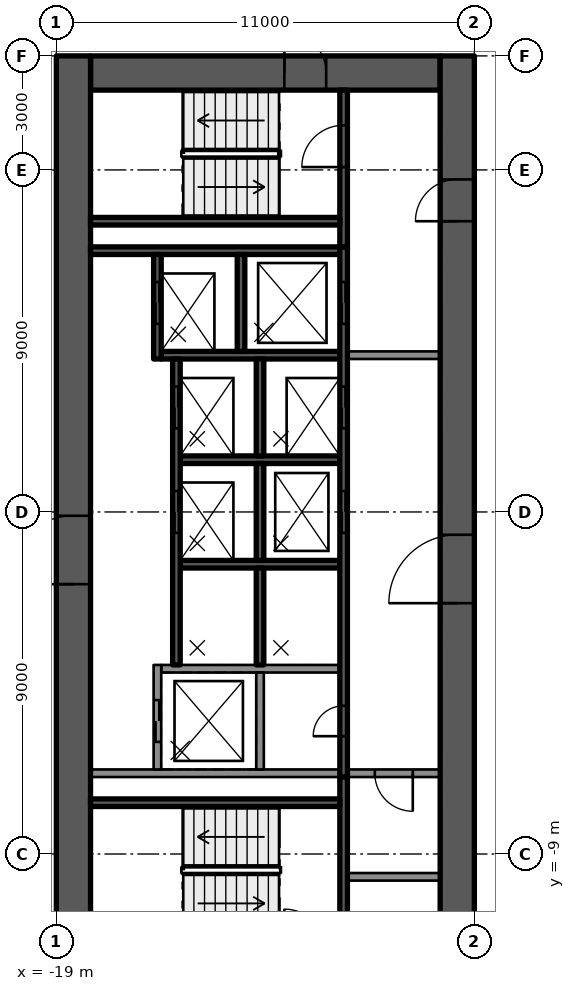
"""IFC4 building model, lengths in metres.
Left out: names, types, materials, properties, quantities, classifications, styles, units other than length and angle.
Written with IfcOpenShell. Run it as: python <this file> out.ifc"""

import sys

from ifc_helpers import new_model, si_unit, direction, frame, frame_2d, origin, place, context, subcontext, project, spatial, rectangle, extrude, element, fill, save


model = new_model("IFC4")
c1 = context("Model", 3, precision=1e-05, world=origin(), true_north=direction((0.0, 1.0)))
c2 = subcontext(c1, "Body", "Model", "MODEL_VIEW")
j1 = project(units=[si_unit("LENGTHUNIT", "METRE"), si_unit("PLANEANGLEUNIT", "RADIAN")], contexts=[c1])
p1 = place(None, origin())
s1 = spatial("IfcSite", under=j1, at=p1, CompositionType="ELEMENT")
p2 = place(p1, origin())
s2 = spatial("IfcBuilding", under=s1, at=p2, CompositionType="ELEMENT")
p3 = place(p2, frame((0.0, 0.0, 134.2)))
s3 = spatial("IfcBuildingStorey", under=s2, at=p3, CompositionType="ELEMENT", Elevation=134.2)
p4 = place(p3, frame((-18.1, 11.55, 0.0), z_axis=(0.0, 0.0, 1.0), x_axis=(1.0, 0.0, 0.0)))
e1 = element("IfcWall", 1, at=p4, inside=s3, PredefinedType="SHEAR", context=c2, shape_type="SweptSolid", body=[
    extrude(rectangle(XDim=9.2, YDim=0.9, at=frame_2d((4.6, 0.0))), origin(), (0.0, 0.0, 1.0), 3.5),
])
p5 = place(p4, frame((5.1, 0.0, 0.0)))
e2 = element("IfcOpeningElement", 2, at=p5, cuts=e1, PredefinedType="OPENING", context=c2, shape_type="SweptSolid", body=[
    extrude(rectangle(XDim=1.1, YDim=2.1, at=frame_2d((0.55, 1.05))), frame((0.0, 0.46, 0.0), z_axis=(0.0, -1.0, 0.0), x_axis=(1.0, 0.0, 0.0)), (0.0, 0.0, 1.0), 0.92),
])
p6 = place(p3, frame((-18.55, -12.0, 0.0), z_axis=(0.0, 0.0, 1.0), x_axis=(0.0, 1.0, 0.0)))
e3 = element("IfcWall", 3, at=p6, inside=s3, PredefinedType="SHEAR", context=c2, shape_type="SweptSolid", body=[
    extrude(rectangle(XDim=24.0, YDim=0.9, at=frame_2d((12.0, 0.0))), origin(), (0.0, 0.0, 1.0), 3.5),
])
p7 = place(p6, frame((10.1, 0.0, 0.0)))
e4 = element("IfcOpeningElement", 4, at=p7, cuts=e3, PredefinedType="OPENING", context=c2, shape_type="SweptSolid", body=[
    extrude(rectangle(XDim=1.8, YDim=2.1, at=frame_2d((0.9, 1.05))), frame((0.0, 0.46, 0.0), z_axis=(0.0, -1.0, 0.0), x_axis=(1.0, 0.0, 0.0)), (0.0, 0.0, 1.0), 0.92),
])
p8 = place(p3, frame((-8.45, -12.0, 0.0), z_axis=(0.0, 0.0, 1.0), x_axis=(0.0, 1.0, 0.0)))
e5 = element("IfcWall", 5, at=p8, inside=s3, PredefinedType="SHEAR", context=c2, shape_type="SweptSolid", body=[
    extrude(rectangle(XDim=24.0, YDim=0.9, at=frame_2d((12.0, 0.0))), origin(), (0.0, 0.0, 1.0), 3.5),
])
p9 = place(p8, frame((9.6, 0.0, 0.0)))
e6 = element("IfcOpeningElement", 6, at=p9, cuts=e5, PredefinedType="OPENING", context=c2, shape_type="SweptSolid", body=[
    extrude(rectangle(XDim=1.8, YDim=2.1, at=frame_2d((0.9, 1.05))), frame((0.0, 0.46, 0.0), z_axis=(0.0, -1.0, 0.0), x_axis=(1.0, 0.0, 0.0)), (0.0, 0.0, 1.0), 0.92),
])
p10 = place(p8, frame((19.65, 0.0, 0.0)))
e7 = element("IfcOpeningElement", 7, at=p10, cuts=e5, PredefinedType="OPENING", context=c2, shape_type="SweptSolid", body=[
    extrude(rectangle(XDim=1.1, YDim=2.1, at=frame_2d((0.55, 1.05))), frame((0.0, 0.46, 0.0), z_axis=(0.0, -1.0, 0.0), x_axis=(1.0, 0.0, 0.0)), (0.0, 0.0, 1.0), 0.92),
])
for number, where, z_axis, x_axis in (
    (8, (-11.54, 6.875, 0.0), (0.0, 0.0, 1.0), (-1.0, 0.0, 0.0)),
    (9, (-11.54, -6.875, 0.0), (0.0, 0.0, 1.0), (-1.0, 0.0, 0.0)),
):
    element("IfcWall", number, at=place(p3, frame(where, z_axis=z_axis, x_axis=x_axis)), inside=s3, PredefinedType="SOLIDWALL", context=c2, shape_type="SweptSolid", body=[
        extrude(rectangle(XDim=6.56, YDim=0.2, at=frame_2d((3.28, 0.0))), origin(), (0.0, 0.0, 1.0), 3.09),
    ])
p11 = place(p3, frame((-11.54, -4.125, 0.0), z_axis=(0.0, 0.0, 1.0), x_axis=(-1.0, 0.0, 0.0)))
e10 = element("IfcWall", 10, at=p11, inside=s3, PredefinedType="SOLIDWALL", context=c2, shape_type="SweptSolid", body=[
    extrude(rectangle(XDim=4.7, YDim=0.2, at=frame_2d((2.35, 0.0))), origin(), (0.0, 0.0, 1.0), 3.09),
])
for number, where, z_axis, x_axis in (
    (11, (-11.54, -1.375, 0.0), (0.0, 0.0, 1.0), (-1.0, 0.0, 0.0)),
    (12, (-11.54, 1.375, 0.0), (0.0, 0.0, 1.0), (-1.0, 0.0, 0.0)),
):
    element("IfcWall", number, at=place(p3, frame(where, z_axis=z_axis, x_axis=x_axis)), inside=s3, PredefinedType="SOLIDWALL", context=c2, shape_type="SweptSolid", body=[
        extrude(rectangle(XDim=4.2, YDim=0.2, at=frame_2d((2.1, 0.0))), origin(), (0.0, 0.0, 1.0), 3.09),
    ])
p12 = place(p3, frame((-11.54, 4.125, 0.0), z_axis=(0.0, 0.0, 1.0), x_axis=(-1.0, 0.0, 0.0)))
e13 = element("IfcWall", 13, at=p12, inside=s3, PredefinedType="SOLIDWALL", context=c2, shape_type="SweptSolid", body=[
    extrude(rectangle(XDim=4.7, YDim=0.2, at=frame_2d((2.35, 0.0))), origin(), (0.0, 0.0, 1.0), 3.09),
])
p13 = place(p3, frame((-11.44, -6.975, 0.0), z_axis=(0.0, 0.0, 1.0), x_axis=(0.0, 1.0, 0.0)))
e14 = element("IfcWall", 14, at=p13, inside=s3, PredefinedType="SOLIDWALL", context=c2, shape_type="SweptSolid", body=[
    extrude(rectangle(XDim=13.95, YDim=0.2, at=frame_2d((6.975, 0.0))), origin(), (0.0, 0.0, 1.0), 3.09),
])
p14 = place(p13, frame((6.425, 0.0, 0.0)))
e15 = element("IfcOpeningElement", 15, at=p14, cuts=e14, PredefinedType="OPENING", context=c2, shape_type="SweptSolid", body=[
    extrude(rectangle(XDim=1.1, YDim=2.1, at=frame_2d((0.55, 1.05))), frame((0.0, 0.11, 0.0), z_axis=(0.0, -1.0, 0.0), x_axis=(1.0, 0.0, 0.0)), (0.0, 0.0, 1.0), 0.22),
])
p15 = place(p13, frame((9.175, 0.0, 0.0)))
e16 = element("IfcOpeningElement", 16, at=p15, cuts=e14, PredefinedType="OPENING", context=c2, shape_type="SweptSolid", body=[
    extrude(rectangle(XDim=1.1, YDim=2.1, at=frame_2d((0.55, 1.05))), frame((0.0, 0.11, 0.0), z_axis=(0.0, -1.0, 0.0), x_axis=(1.0, 0.0, 0.0)), (0.0, 0.0, 1.0), 0.22),
])
p16 = place(p13, frame((11.925, 0.0, 0.0)))
e17 = element("IfcOpeningElement", 17, at=p16, cuts=e14, PredefinedType="OPENING", context=c2, shape_type="SweptSolid", body=[
    extrude(rectangle(XDim=1.1, YDim=2.1, at=frame_2d((0.55, 1.05))), frame((0.0, 0.11, 0.0), z_axis=(0.0, -1.0, 0.0), x_axis=(1.0, 0.0, 0.0)), (0.0, 0.0, 1.0), 0.22),
])
p17 = place(p13, frame((1.075, 0.0, 0.0)))
e18 = element("IfcOpeningElement", 18, at=p17, cuts=e14, PredefinedType="OPENING", context=c2, shape_type="SweptSolid", body=[
    extrude(rectangle(XDim=0.8, YDim=2.1, at=frame_2d((0.4, 1.05))), frame((0.0, 0.11, 0.0), z_axis=(0.0, -1.0, 0.0), x_axis=(1.0, 0.0, 0.0)), (0.0, 0.0, 1.0), 0.22),
])
for number, where, z_axis, x_axis in (
    (19, (-13.64, -6.775, 0.0), (0.0, 0.0, 1.0), (0.0, 1.0, 0.0)),
    (20, (-13.64, -4.025, 0.0), (0.0, 0.0, 1.0), (0.0, 1.0, 0.0)),
    (21, (-13.64, -1.275, 0.0), (0.0, 0.0, 1.0), (0.0, 1.0, 0.0)),
    (22, (-13.64, 1.475, 0.0), (0.0, 0.0, 1.0), (0.0, 1.0, 0.0)),
    (23, (-14.14, 4.225, 0.0), (0.0, 0.0, 1.0), (0.0, 1.0, 0.0)),
):
    element("IfcWall", number, at=place(p3, frame(where, z_axis=z_axis, x_axis=x_axis)), inside=s3, PredefinedType="SOLIDWALL", context=c2, shape_type="SweptSolid", body=[
        extrude(rectangle(XDim=2.55, YDim=0.2, at=frame_2d((1.275, 0.0))), origin(), (0.0, 0.0, 1.0), 3.09),
    ])
p18 = place(p3, frame((-16.34, -6.775, 0.0), z_axis=(0.0, 0.0, 1.0), x_axis=(0.0, 1.0, 0.0)))
e24 = element("IfcWall", 24, at=p18, inside=s3, PredefinedType="SOLIDWALL", context=c2, shape_type="SweptSolid", body=[
    extrude(rectangle(XDim=2.75, YDim=0.2, at=frame_2d((1.375, 0.0))), origin(), (0.0, 0.0, 1.0), 3.09),
])
p19 = place(p18, frame((0.725, 0.0, 0.0)))
e25 = element("IfcOpeningElement", 25, at=p19, cuts=e24, PredefinedType="OPENING", context=c2, shape_type="SweptSolid", body=[
    extrude(rectangle(XDim=1.1, YDim=2.1, at=frame_2d((0.55, 1.05))), frame((0.0, 0.11, 0.0), z_axis=(0.0, -1.0, 0.0), x_axis=(1.0, 0.0, 0.0)), (0.0, 0.0, 1.0), 0.22),
])
p20 = place(p3, frame((-15.84, -4.025, 0.0), z_axis=(0.0, 0.0, 1.0), x_axis=(0.0, 1.0, 0.0)))
e26 = element("IfcWall", 26, at=p20, inside=s3, PredefinedType="SOLIDWALL", context=c2, shape_type="SweptSolid", body=[
    extrude(rectangle(XDim=8.05, YDim=0.2, at=frame_2d((4.025, 0.0))), origin(), (0.0, 0.0, 1.0), 3.09),
])
p21 = place(p20, frame((3.475, 0.0, 0.0)))
e27 = element("IfcOpeningElement", 27, at=p21, cuts=e26, PredefinedType="OPENING", context=c2, shape_type="SweptSolid", body=[
    extrude(rectangle(XDim=1.1, YDim=2.1, at=frame_2d((0.55, 1.05))), frame((0.0, 0.11, 0.0), z_axis=(0.0, -1.0, 0.0), x_axis=(1.0, 0.0, 0.0)), (0.0, 0.0, 1.0), 0.22),
])
p22 = place(p20, frame((6.225, 0.0, 0.0)))
e28 = element("IfcOpeningElement", 28, at=p22, cuts=e26, PredefinedType="OPENING", context=c2, shape_type="SweptSolid", body=[
    extrude(rectangle(XDim=1.1, YDim=2.1, at=frame_2d((0.55, 1.05))), frame((0.0, 0.11, 0.0), z_axis=(0.0, -1.0, 0.0), x_axis=(1.0, 0.0, 0.0)), (0.0, 0.0, 1.0), 0.22),
])
p23 = place(p3, frame((-16.34, 4.025, 0.0), z_axis=(0.0, 0.0, 1.0), x_axis=(0.0, 1.0, 0.0)))
e29 = element("IfcWall", 29, at=p23, inside=s3, PredefinedType="SOLIDWALL", context=c2, shape_type="SweptSolid", body=[
    extrude(rectangle(XDim=2.75, YDim=0.2, at=frame_2d((1.375, 0.0))), origin(), (0.0, 0.0, 1.0), 3.09),
])
p24 = place(p23, frame((0.925, 0.0, 0.0)))
e30 = element("IfcOpeningElement", 30, at=p24, cuts=e29, PredefinedType="OPENING", context=c2, shape_type="SweptSolid", body=[
    extrude(rectangle(XDim=1.1, YDim=2.1, at=frame_2d((0.55, 1.05))), frame((0.0, 0.11, 0.0), z_axis=(0.0, -1.0, 0.0), x_axis=(1.0, 0.0, 0.0)), (0.0, 0.0, 1.0), 0.22),
])
p25 = place(p3, frame((-11.44, 6.975, 0.0), z_axis=(0.0, 0.0, 1.0), x_axis=(0.0, 1.0, 0.0)))
e31 = element("IfcWall", 31, at=p25, inside=s3, PredefinedType="SOLIDWALL", context=c2, shape_type="SweptSolid", body=[
    extrude(rectangle(XDim=4.125, YDim=0.2, at=frame_2d((2.062, 0.0))), origin(), (0.0, 0.0, 1.0), 3.09),
])
p26 = place(p25, frame((2.1, 0.0, 0.0)))
e32 = element("IfcOpeningElement", 32, at=p26, cuts=e31, PredefinedType="OPENING", context=c2, shape_type="SweptSolid", body=[
    extrude(rectangle(XDim=1.1, YDim=2.1, at=frame_2d((0.55, 1.05))), frame((0.0, 0.11, 0.0), z_axis=(0.0, -1.0, 0.0), x_axis=(1.0, 0.0, 0.0)), (0.0, 0.0, 1.0), 0.22),
])
p27 = place(p3, frame((-11.54, 7.65, 0.0), z_axis=(0.0, 0.0, 1.0), x_axis=(-1.0, 0.0, 0.0)))
e33 = element("IfcWall", 33, at=p27, inside=s3, PredefinedType="SOLIDWALL", context=c2, shape_type="SweptSolid", body=[
    extrude(rectangle(XDim=6.56, YDim=0.2, at=frame_2d((3.28, 0.0))), origin(), (0.0, 0.0, 1.0), 3.09),
])
p28 = place(p3, frame((-11.44, -11.1, 0.0), z_axis=(0.0, 0.0, 1.0), x_axis=(0.0, 1.0, 0.0)))
e34 = element("IfcWall", 34, at=p28, inside=s3, PredefinedType="SOLIDWALL", context=c2, shape_type="SweptSolid", body=[
    extrude(rectangle(XDim=4.125, YDim=0.2, at=frame_2d((2.062, 0.0))), origin(), (0.0, 0.0, 1.0), 3.09),
])
p29 = place(p3, frame((-11.54, -7.65, 0.0), z_axis=(0.0, 0.0, 1.0), x_axis=(-1.0, 0.0, 0.0)))
e35 = element("IfcWall", 35, at=p29, inside=s3, PredefinedType="SOLIDWALL", context=c2, shape_type="SweptSolid", body=[
    extrude(rectangle(XDim=6.56, YDim=0.2, at=frame_2d((3.28, 0.0))), origin(), (0.0, 0.0, 1.0), 3.09),
])
p30 = place(p3, frame((-8.9, 4.125, 0.0), z_axis=(0.0, 0.0, 1.0), x_axis=(-1.0, 0.0, 0.0)))
e36 = element("IfcWall", 36, at=p30, inside=s3, PredefinedType="PARTITIONING", context=c2, shape_type="SweptSolid", body=[
    extrude(rectangle(XDim=2.44, YDim=0.2, at=frame_2d((1.22, 0.0))), origin(), (0.0, 0.0, 1.0), 3.09),
])
p31 = place(p3, frame((-8.9, -6.875, 0.0), z_axis=(0.0, 0.0, 1.0), x_axis=(-1.0, 0.0, 0.0)))
e37 = element("IfcWall", 37, at=p31, inside=s3, PredefinedType="PARTITIONING", context=c2, shape_type="SweptSolid", body=[
    extrude(rectangle(XDim=2.44, YDim=0.2, at=frame_2d((1.22, 0.0))), origin(), (0.0, 0.0, 1.0), 3.09),
])
p32 = place(p31, frame((0.72, 0.0, 0.0)))
e38 = element("IfcOpeningElement", 38, at=p32, cuts=e37, PredefinedType="OPENING", context=c2, shape_type="SweptSolid", body=[
    extrude(rectangle(XDim=1.0, YDim=2.1, at=frame_2d((0.5, 1.05))), frame((0.0, 0.11, 0.0), z_axis=(0.0, -1.0, 0.0), x_axis=(1.0, 0.0, 0.0)), (0.0, 0.0, 1.0), 0.22),
])
p33 = place(p3, frame((-8.9, -9.6, 0.0), z_axis=(0.0, 0.0, 1.0), x_axis=(-1.0, 0.0, 0.0)))
e39 = element("IfcWall", 39, at=p33, inside=s3, PredefinedType="PARTITIONING", context=c2, shape_type="SweptSolid", body=[
    extrude(rectangle(XDim=2.44, YDim=0.2, at=frame_2d((1.22, 0.0))), origin(), (0.0, 0.0, 1.0), 3.09),
])
p34 = place(p19, origin())
e40 = element("IfcDoor", 40, at=p34, inside=s3, OperationType="DOUBLE_DOOR_SLIDING", PredefinedType="DOOR", context=c2, shape_type="SweptSolid", body=[
    extrude(rectangle(XDim=1.1, YDim=2.1, at=frame_2d((0.55, 1.05))), frame((0.0, 0.025, 0.0), z_axis=(0.0, -1.0, 0.0), x_axis=(1.0, 0.0, 0.0)), (0.0, 0.0, 1.0), 0.05),
])
fill(e25, e40)
p35 = place(p14, origin())
e41 = element("IfcDoor", 41, at=p35, inside=s3, OperationType="DOUBLE_DOOR_SLIDING", PredefinedType="DOOR", context=c2, shape_type="SweptSolid", body=[
    extrude(rectangle(XDim=1.1, YDim=2.1, at=frame_2d((0.55, 1.05))), frame((0.0, 0.025, 0.0), z_axis=(0.0, -1.0, 0.0), x_axis=(1.0, 0.0, 0.0)), (0.0, 0.0, 1.0), 0.05),
])
fill(e15, e41)
p36 = place(p21, origin())
e42 = element("IfcDoor", 42, at=p36, inside=s3, OperationType="DOUBLE_DOOR_SLIDING", PredefinedType="DOOR", context=c2, shape_type="SweptSolid", body=[
    extrude(rectangle(XDim=1.1, YDim=2.1, at=frame_2d((0.55, 1.05))), frame((0.0, 0.025, 0.0), z_axis=(0.0, -1.0, 0.0), x_axis=(1.0, 0.0, 0.0)), (0.0, 0.0, 1.0), 0.05),
])
fill(e27, e42)
p37 = place(p15, origin())
e43 = element("IfcDoor", 43, at=p37, inside=s3, OperationType="DOUBLE_DOOR_SLIDING", PredefinedType="DOOR", context=c2, shape_type="SweptSolid", body=[
    extrude(rectangle(XDim=1.1, YDim=2.1, at=frame_2d((0.55, 1.05))), frame((0.0, 0.025, 0.0), z_axis=(0.0, -1.0, 0.0), x_axis=(1.0, 0.0, 0.0)), (0.0, 0.0, 1.0), 0.05),
])
fill(e16, e43)
p38 = place(p22, origin())
e44 = element("IfcDoor", 44, at=p38, inside=s3, OperationType="DOUBLE_DOOR_SLIDING", PredefinedType="DOOR", context=c2, shape_type="SweptSolid", body=[
    extrude(rectangle(XDim=1.1, YDim=2.1, at=frame_2d((0.55, 1.05))), frame((0.0, 0.025, 0.0), z_axis=(0.0, -1.0, 0.0), x_axis=(1.0, 0.0, 0.0)), (0.0, 0.0, 1.0), 0.05),
])
fill(e28, e44)
p39 = place(p16, origin())
e45 = element("IfcDoor", 45, at=p39, inside=s3, OperationType="DOUBLE_DOOR_SLIDING", PredefinedType="DOOR", context=c2, shape_type="SweptSolid", body=[
    extrude(rectangle(XDim=1.1, YDim=2.1, at=frame_2d((0.55, 1.05))), frame((0.0, 0.025, 0.0), z_axis=(0.0, -1.0, 0.0), x_axis=(1.0, 0.0, 0.0)), (0.0, 0.0, 1.0), 0.05),
])
fill(e17, e45)
p40 = place(p24, origin())
e46 = element("IfcDoor", 46, at=p40, inside=s3, OperationType="DOUBLE_DOOR_SLIDING", PredefinedType="DOOR", context=c2, shape_type="SweptSolid", body=[
    extrude(rectangle(XDim=1.1, YDim=2.1, at=frame_2d((0.55, 1.05))), frame((0.0, 0.025, 0.0), z_axis=(0.0, -1.0, 0.0), x_axis=(1.0, 0.0, 0.0)), (0.0, 0.0, 1.0), 0.05),
])
fill(e30, e46)
p41 = place(p17, origin())
e47 = element("IfcDoor", 47, at=p41, inside=s3, OperationType="SINGLE_SWING_LEFT", PredefinedType="DOOR", context=c2, shape_type="SweptSolid", body=[
    extrude(rectangle(XDim=0.8, YDim=2.1, at=frame_2d((0.4, 1.05))), frame((0.0, 0.025, 0.0), z_axis=(0.0, -1.0, 0.0), x_axis=(1.0, 0.0, 0.0)), (0.0, 0.0, 1.0), 0.05),
])
fill(e18, e47)
p42 = place(p9, origin())
e48 = element("IfcDoor", 48, at=p42, inside=s3, OperationType="SINGLE_SWING_LEFT", PredefinedType="DOOR", context=c2, shape_type="SweptSolid", body=[
    extrude(rectangle(XDim=1.8, YDim=2.1, at=frame_2d((0.9, 1.05))), frame((0.0, 0.025, 0.0), z_axis=(0.0, -1.0, 0.0), x_axis=(1.0, 0.0, 0.0)), (0.0, 0.0, 1.0), 0.05),
])
fill(e6, e48)
p43 = place(p7, origin())
e49 = element("IfcDoor", 49, at=p43, inside=s3, OperationType="SINGLE_SWING_LEFT", PredefinedType="DOOR", context=c2, shape_type="SweptSolid", body=[
    extrude(rectangle(XDim=1.8, YDim=2.1, at=frame_2d((0.9, 1.05))), frame((0.0, 0.025, 0.0), z_axis=(0.0, -1.0, 0.0), x_axis=(1.0, 0.0, 0.0)), (0.0, 0.0, 1.0), 0.05),
])
fill(e4, e49)
p44 = place(p10, origin())
e50 = element("IfcDoor", 50, at=p44, inside=s3, OperationType="SINGLE_SWING_RIGHT", PredefinedType="DOOR", context=c2, shape_type="SweptSolid", body=[
    extrude(rectangle(XDim=1.1, YDim=2.1, at=frame_2d((0.55, 1.05))), frame((0.0, 0.025, 0.0), z_axis=(0.0, -1.0, 0.0), x_axis=(1.0, 0.0, 0.0)), (0.0, 0.0, 1.0), 0.05),
])
fill(e7, e50)
p45 = place(p5, origin())
e51 = element("IfcDoor", 51, at=p45, inside=s3, OperationType="SINGLE_SWING_RIGHT", PredefinedType="DOOR", context=c2, shape_type="SweptSolid", body=[
    extrude(rectangle(XDim=1.1, YDim=2.1, at=frame_2d((0.55, 1.05))), frame((0.0, 0.025, 0.0), z_axis=(0.0, -1.0, 0.0), x_axis=(1.0, 0.0, 0.0)), (0.0, 0.0, 1.0), 0.05),
])
fill(e2, e51)
p46 = place(p26, origin())
e52 = element("IfcDoor", 52, at=p46, inside=s3, OperationType="SINGLE_SWING_RIGHT", PredefinedType="DOOR", context=c2, shape_type="SweptSolid", body=[
    extrude(rectangle(XDim=1.1, YDim=2.1, at=frame_2d((0.55, 1.05))), frame((0.0, 0.025, 0.0), z_axis=(0.0, -1.0, 0.0), x_axis=(1.0, 0.0, 0.0)), (0.0, 0.0, 1.0), 0.05),
])
fill(e32, e52)
p47 = place(p32, origin())
e53 = element("IfcDoor", 53, at=p47, inside=s3, OperationType="SINGLE_SWING_RIGHT", PredefinedType="DOOR", context=c2, shape_type="SweptSolid", body=[
    extrude(rectangle(XDim=1.0, YDim=2.1, at=frame_2d((0.5, 1.05))), frame((0.0, 0.025, 0.0), z_axis=(0.0, -1.0, 0.0), x_axis=(1.0, 0.0, 0.0)), (0.0, 0.0, 1.0), 0.05),
])
fill(e38, e53)
save(model, sys.argv[1])
